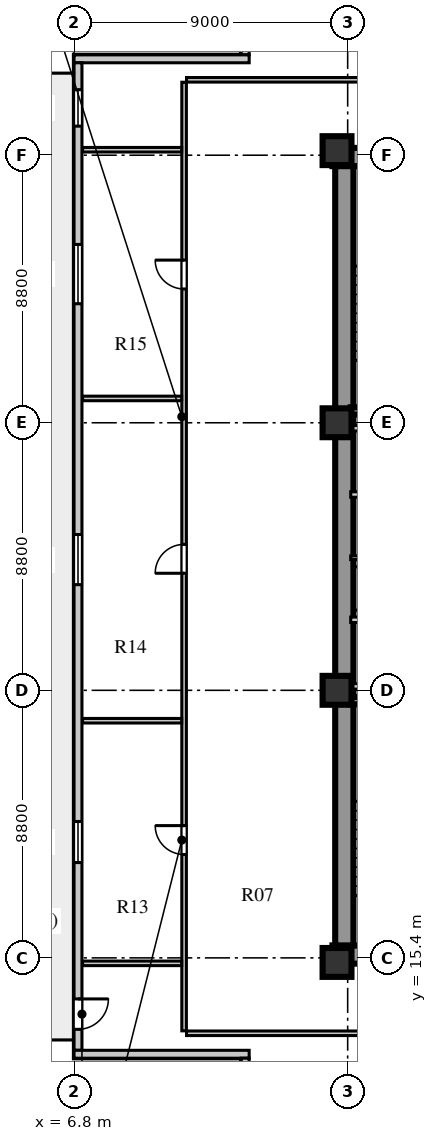
"""IFC4 building model, lengths in metres.
Left out: names, types, materials, properties, quantities, classifications, styles, units other than length and angle.
Written with IfcOpenShell. Run it as: python <this file> out.ifc"""

import sys

from ifc_helpers import new_model, si_unit, direction, frame, frame_2d, origin, origin_2d, place, context, subcontext, project, spatial, rectangle, extrude, element, fill, save


model = new_model("IFC4")
c1 = context("Model", 3, precision=1e-05, world=origin(), true_north=direction((0.0, 1.0)))
c2 = subcontext(c1, "Body", "Model", "MODEL_VIEW")
j1 = project(units=[si_unit("LENGTHUNIT", "METRE"), si_unit("PLANEANGLEUNIT", "RADIAN")], contexts=[c1])
p1 = place(None, origin())
s1 = spatial("IfcSite", under=j1, at=p1, CompositionType="ELEMENT")
p2 = place(p1, origin())
s2 = spatial("IfcBuilding", under=s1, at=p2, CompositionType="ELEMENT")
p3 = place(p2, frame((0.0, 0.0, 50.0)))
s3 = spatial("IfcBuildingStorey", under=s2, at=p3, CompositionType="ELEMENT", Elevation=50.0)
for number, where, z_axis, x_axis in (
    (1, (15.3, 15.51, 0.0), (0.0, 0.0, 1.0), (1.0, 0.0, 0.0)),
    (2, (15.3, 41.74, 0.0), (0.0, 0.0, 1.0), (1.0, 0.0, 0.0)),
):
    element("IfcWall", number, at=place(p3, frame(where, z_axis=z_axis, x_axis=x_axis)), inside=s3, PredefinedType="SHEAR", context=c2, shape_type="SweptSolid", body=[
        extrude(rectangle(XDim=9.88, YDim=0.6, at=frame_2d((4.94, 0.0))), origin(), (0.0, 0.0, 1.0), 3.72),
    ])
p4 = place(p3, frame((15.69, 15.81, 0.0), z_axis=(0.0, 0.0, 1.0), x_axis=(0.0, 1.0, 0.0)))
e3 = element("IfcWall", 3, at=p4, inside=s3, PredefinedType="SHEAR", context=c2, shape_type="SweptSolid", body=[
    extrude(rectangle(XDim=25.63, YDim=0.6, at=frame_2d((12.815, 0.0))), origin(), (0.0, 0.0, 1.0), 3.72),
])
for number, where, z_axis, x_axis in (
    (4, (15.45, 15.25, 0.0), (0.0, 0.0, 1.0), (1.0, 0.0, 0.0)),
    (5, (15.45, 24.2, 0.0), (0.0, 0.0, 1.0), (1.0, 0.0, 0.0)),
    (6, (15.45, 33.0, 0.0), (0.0, 0.0, 1.0), (1.0, 0.0, 0.0)),
    (7, (15.45, 41.95, 0.0), (0.0, 0.0, 1.0), (1.0, 0.0, 0.0)),
):
    element("IfcColumn", number, at=place(p3, frame(where, z_axis=z_axis, x_axis=x_axis)), inside=s3, PredefinedType="COLUMN", context=c2, shape_type="SweptSolid", body=[
        extrude(rectangle(XDim=0.95, YDim=0.95, at=origin_2d()), origin(), (0.0, 0.0, 1.0), 3.72),
    ])
p5 = place(p3, frame((12.43, 50.34, 0.0), z_axis=(0.0, 0.0, 1.0), x_axis=(0.0, -1.0, 0.0)))
e8 = element("IfcWall", 8, at=p5, inside=s3, PredefinedType="SOLIDWALL", context=c2, shape_type="SweptSolid", body=[
    extrude(rectangle(XDim=5.24, YDim=0.26, at=frame_2d((2.62, 0.0))), origin(), (0.0, 0.0, 1.0), 3.72),
])
p6 = place(p3, frame((12.56, 44.97, 0.0), z_axis=(0.0, 0.0, 1.0), x_axis=(-1.0, 0.0, 0.0)))
e9 = element("IfcWall", 9, at=p6, inside=s3, PredefinedType="SOLIDWALL", context=c2, shape_type="SweptSolid", body=[
    extrude(rectangle(XDim=5.76, YDim=0.26, at=frame_2d((2.88, 0.0))), origin(), (0.0, 0.0, 1.0), 3.72),
])
p7 = place(p3, frame((6.93, 44.84, 0.0), z_axis=(0.0, 0.0, 1.0), x_axis=(0.0, -1.0, 0.0)))
e10 = element("IfcWall", 10, at=p7, inside=s3, PredefinedType="SOLIDWALL", context=c2, shape_type="SweptSolid", body=[
    extrude(rectangle(XDim=32.48, YDim=0.26, at=frame_2d((16.24, 0.0))), origin(), (0.0, 0.0, 1.0), 3.72),
])
p8 = place(p7, frame((30.79, 0.0, 0.0)))
e11 = element("IfcOpeningElement", 11, at=p8, cuts=e10, PredefinedType="OPENING", context=c2, shape_type="SweptSolid", body=[
    extrude(rectangle(XDim=1.0, YDim=2.05, at=frame_2d((0.5, 1.025))), frame((0.0, 0.14, 0.0), z_axis=(0.0, -1.0, 0.0), x_axis=(1.0, 0.0, 0.0)), (0.0, 0.0, 1.0), 0.28),
])
p9 = place(p7, frame((24.955, 0.0, 0.8)))
e12 = element("IfcOpeningElement", 12, at=p9, cuts=e10, PredefinedType="OPENING", context=c2, shape_type="SweptSolid", body=[
    extrude(rectangle(XDim=1.35, YDim=1.9, at=frame_2d((0.675, 0.95))), frame((0.0, 0.14, 0.0), z_axis=(0.0, -1.0, 0.0), x_axis=(1.0, 0.0, 0.0)), (0.0, 0.0, 1.0), 0.28),
])
p10 = place(p7, frame((15.515, 0.0, 0.8)))
e13 = element("IfcOpeningElement", 13, at=p10, cuts=e10, PredefinedType="OPENING", context=c2, shape_type="SweptSolid", body=[
    extrude(rectangle(XDim=1.65, YDim=1.95, at=frame_2d((0.825, 0.975))), frame((0.0, 0.14, 0.0), z_axis=(0.0, -1.0, 0.0), x_axis=(1.0, 0.0, 0.0)), (0.0, 0.0, 1.0), 0.28),
])
p11 = place(p7, frame((5.975, 0.0, 0.8)))
e14 = element("IfcOpeningElement", 14, at=p11, cuts=e10, PredefinedType="OPENING", context=c2, shape_type="SweptSolid", body=[
    extrude(rectangle(XDim=1.95, YDim=2.0, at=frame_2d((0.975, 1.0))), frame((0.0, 0.14, 0.0), z_axis=(0.0, -1.0, 0.0), x_axis=(1.0, 0.0, 0.0)), (0.0, 0.0, 1.0), 0.28),
])
p12 = place(p7, frame((0.885, 0.0, 0.8)))
e15 = element("IfcOpeningElement", 15, at=p12, cuts=e10, PredefinedType="OPENING", context=c2, shape_type="SweptSolid", body=[
    extrude(rectangle(XDim=1.2, YDim=1.75, at=frame_2d((0.6, 0.875))), frame((0.0, 0.14, 0.0), z_axis=(0.0, -1.0, 0.0), x_axis=(1.0, 0.0, 0.0)), (0.0, 0.0, 1.0), 0.28),
])
p13 = place(p3, frame((6.8, 12.23, 0.0), z_axis=(0.0, 0.0, 1.0), x_axis=(1.0, 0.0, 0.0)))
e16 = element("IfcWall", 16, at=p13, inside=s3, PredefinedType="SOLIDWALL", context=c2, shape_type="SweptSolid", body=[
    extrude(rectangle(XDim=5.76, YDim=0.26, at=frame_2d((2.88, 0.0))), origin(), (0.0, 0.0, 1.0), 3.72),
])
p14 = place(p3, frame((12.43, 12.1, 0.0), z_axis=(0.0, 0.0, 1.0), x_axis=(0.0, -1.0, 0.0)))
e17 = element("IfcWall", 17, at=p14, inside=s3, PredefinedType="SOLIDWALL", context=c2, shape_type="SweptSolid", body=[
    extrude(rectangle(XDim=5.24, YDim=0.26, at=frame_2d((2.62, 0.0))), origin(), (0.0, 0.0, 1.0), 3.72),
])
p15 = place(p3, frame((15.9, 23.86, 0.0), z_axis=(0.0, 0.0, 1.0), x_axis=(1.0, 0.0, 0.0)))
e18 = element("IfcWall", 18, at=p15, inside=s3, PredefinedType="SHEAR", context=c2, shape_type="SweptSolid", body=[
    extrude(rectangle(XDim=3.52, YDim=0.24, at=frame_2d((1.76, 0.0))), origin(), (0.0, 0.0, 1.0), 4.0),
])
p16 = place(p3, frame((15.9, 26.52, 0.0), z_axis=(0.0, 0.0, 1.0), x_axis=(1.0, 0.0, 0.0)))
e19 = element("IfcWall", 19, at=p16, inside=s3, PredefinedType="SOLIDWALL", context=c2, shape_type="SweptSolid", body=[
    extrude(rectangle(XDim=8.68, YDim=0.18, at=frame_2d((4.34, 0.0))), origin(), (0.0, 0.0, 1.0), 3.72),
])
p17 = place(p16, frame((1.76, 0.0, 0.0)))
e20 = element("IfcOpeningElement", 20, at=p17, cuts=e19, PredefinedType="OPENING", context=c2, shape_type="SweptSolid", body=[
    extrude(rectangle(XDim=1.0, YDim=2.1, at=frame_2d((0.5, 1.05))), frame((0.0, 0.1, 0.0), z_axis=(0.0, -1.0, 0.0), x_axis=(1.0, 0.0, 0.0)), (0.0, 0.0, 1.0), 0.2),
])
p18 = place(p16, frame((3.6, 0.0, 0.0)))
e21 = element("IfcOpeningElement", 21, at=p18, cuts=e19, PredefinedType="OPENING", context=c2, shape_type="SweptSolid", body=[
    extrude(rectangle(XDim=1.0, YDim=2.1, at=frame_2d((0.5, 1.05))), frame((0.0, 0.1, 0.0), z_axis=(0.0, -1.0, 0.0), x_axis=(1.0, 0.0, 0.0)), (0.0, 0.0, 1.0), 0.2),
])
p19 = place(p16, frame((5.44, 0.0, 0.0)))
e22 = element("IfcOpeningElement", 22, at=p19, cuts=e19, PredefinedType="OPENING", context=c2, shape_type="SweptSolid", body=[
    extrude(rectangle(XDim=1.0, YDim=2.1, at=frame_2d((0.5, 1.05))), frame((0.0, 0.1, 0.0), z_axis=(0.0, -1.0, 0.0), x_axis=(1.0, 0.0, 0.0)), (0.0, 0.0, 1.0), 0.2),
])
p20 = place(p16, frame((7.28, 0.0, 0.0)))
e23 = element("IfcOpeningElement", 23, at=p20, cuts=e19, PredefinedType="OPENING", context=c2, shape_type="SweptSolid", body=[
    extrude(rectangle(XDim=1.0, YDim=2.1, at=frame_2d((0.5, 1.05))), frame((0.0, 0.1, 0.0), z_axis=(0.0, -1.0, 0.0), x_axis=(1.0, 0.0, 0.0)), (0.0, 0.0, 1.0), 0.2),
])
p21 = place(p3, frame((15.9, 24.33, 0.0), z_axis=(0.0, 0.0, 1.0), x_axis=(1.0, 0.0, 0.0)))
e24 = element("IfcWall", 24, at=p21, inside=s3, PredefinedType="SOLIDWALL", context=c2, shape_type="SweptSolid", body=[
    extrude(rectangle(XDim=8.68, YDim=0.18, at=frame_2d((4.34, 0.0))), origin(), (0.0, 0.0, 1.0), 3.02),
])
p22 = place(p3, frame((15.9, 28.56, 0.0), z_axis=(0.0, 0.0, 1.0), x_axis=(1.0, 0.0, 0.0)))
e25 = element("IfcWall", 25, at=p22, inside=s3, PredefinedType="PARTITIONING", context=c2, shape_type="SweptSolid", body=[
    extrude(rectangle(XDim=1.2, YDim=0.12, at=frame_2d((0.6, 0.0))), origin(), (0.0, 0.0, 1.0), 3.72),
])
p23 = place(p3, frame((15.9, 30.64, 0.0), z_axis=(0.0, 0.0, 1.0), x_axis=(1.0, 0.0, 0.0)))
e26 = element("IfcWall", 26, at=p23, inside=s3, PredefinedType="SOLIDWALL", context=c2, shape_type="SweptSolid", body=[
    extrude(rectangle(XDim=8.68, YDim=0.18, at=frame_2d((4.34, 0.0))), origin(), (0.0, 0.0, 1.0), 3.72),
])
p24 = place(p23, frame((1.76, 0.0, 0.0)))
e27 = element("IfcOpeningElement", 27, at=p24, cuts=e26, PredefinedType="OPENING", context=c2, shape_type="SweptSolid", body=[
    extrude(rectangle(XDim=1.0, YDim=2.1, at=frame_2d((0.5, 1.05))), frame((0.0, 0.1, 0.0), z_axis=(0.0, -1.0, 0.0), x_axis=(1.0, 0.0, 0.0)), (0.0, 0.0, 1.0), 0.2),
])
p25 = place(p23, frame((3.6, 0.0, 0.0)))
e28 = element("IfcOpeningElement", 28, at=p25, cuts=e26, PredefinedType="OPENING", context=c2, shape_type="SweptSolid", body=[
    extrude(rectangle(XDim=1.0, YDim=2.1, at=frame_2d((0.5, 1.05))), frame((0.0, 0.1, 0.0), z_axis=(0.0, -1.0, 0.0), x_axis=(1.0, 0.0, 0.0)), (0.0, 0.0, 1.0), 0.2),
])
p26 = place(p23, frame((5.44, 0.0, 0.0)))
e29 = element("IfcOpeningElement", 29, at=p26, cuts=e26, PredefinedType="OPENING", context=c2, shape_type="SweptSolid", body=[
    extrude(rectangle(XDim=1.0, YDim=2.1, at=frame_2d((0.5, 1.05))), frame((0.0, 0.1, 0.0), z_axis=(0.0, -1.0, 0.0), x_axis=(1.0, 0.0, 0.0)), (0.0, 0.0, 1.0), 0.2),
])
p27 = place(p23, frame((7.28, 0.0, 0.0)))
e30 = element("IfcOpeningElement", 30, at=p27, cuts=e26, PredefinedType="OPENING", context=c2, shape_type="SweptSolid", body=[
    extrude(rectangle(XDim=1.0, YDim=2.1, at=frame_2d((0.5, 1.05))), frame((0.0, 0.1, 0.0), z_axis=(0.0, -1.0, 0.0), x_axis=(1.0, 0.0, 0.0)), (0.0, 0.0, 1.0), 0.2),
])
p28 = place(p3, frame((15.9, 32.82, 0.0), z_axis=(0.0, 0.0, 1.0), x_axis=(1.0, 0.0, 0.0)))
e31 = element("IfcWall", 31, at=p28, inside=s3, PredefinedType="SOLIDWALL", context=c2, shape_type="SweptSolid", body=[
    extrude(rectangle(XDim=8.68, YDim=0.18, at=frame_2d((4.34, 0.0))), origin(), (0.0, 0.0, 1.0), 3.02),
])
p29 = place(p3, frame((15.9, 33.39, 0.0), z_axis=(0.0, 0.0, 1.0), x_axis=(1.0, 0.0, 0.0)))
e32 = element("IfcWall", 32, at=p29, inside=s3, PredefinedType="SHEAR", context=c2, shape_type="SweptSolid", body=[
    extrude(rectangle(XDim=3.52, YDim=0.24, at=frame_2d((1.76, 0.0))), origin(), (0.0, 0.0, 1.0), 4.0),
])
p30 = place(p3, frame((10.42, 13.0, 0.0), z_axis=(0.0, 0.0, 1.0), x_axis=(0.0, 1.0, 0.0)))
e33 = element("IfcWall", 33, at=p30, inside=s3, PredefinedType="PARTITIONING", context=c2, shape_type="SweptSolid", body=[
    extrude(rectangle(XDim=31.2, YDim=0.15, at=frame_2d((15.6, 0.0))), origin(), (0.0, 0.0, 1.0), 3.72),
])
p31 = place(p30, frame((5.8, 0.0, 0.0)))
e34 = element("IfcOpeningElement", 34, at=p31, cuts=e33, PredefinedType="OPENING", context=c2, shape_type="SweptSolid", body=[
    extrude(rectangle(XDim=0.95, YDim=2.08, at=frame_2d((0.475, 1.04))), frame((0.0, 0.085, 0.0), z_axis=(0.0, -1.0, 0.0), x_axis=(1.0, 0.0, 0.0)), (0.0, 0.0, 1.0), 0.17),
])
p32 = place(p30, frame((15.05, 0.0, 0.0)))
e35 = element("IfcOpeningElement", 35, at=p32, cuts=e33, PredefinedType="OPENING", context=c2, shape_type="SweptSolid", body=[
    extrude(rectangle(XDim=0.95, YDim=2.08, at=frame_2d((0.475, 1.04))), frame((0.0, 0.085, 0.0), z_axis=(0.0, -1.0, 0.0), x_axis=(1.0, 0.0, 0.0)), (0.0, 0.0, 1.0), 0.17),
])
p33 = place(p30, frame((24.4, 0.0, 0.0)))
e36 = element("IfcOpeningElement", 36, at=p33, cuts=e33, PredefinedType="OPENING", context=c2, shape_type="SweptSolid", body=[
    extrude(rectangle(XDim=0.95, YDim=2.08, at=frame_2d((0.475, 1.04))), frame((0.0, 0.085, 0.0), z_axis=(0.0, -1.0, 0.0), x_axis=(1.0, 0.0, 0.0)), (0.0, 0.0, 1.0), 0.17),
])
for number, where, z_axis, x_axis in (
    (37, (7.08, 15.22, 0.0), (0.0, 0.0, 1.0), (1.0, 0.0, 0.0)),
    (38, (7.08, 41.98, 0.0), (0.0, 0.0, 1.0), (1.0, 0.0, 0.0)),
):
    element("IfcWall", number, at=place(p3, frame(where, z_axis=z_axis, x_axis=x_axis)), inside=s3, PredefinedType="PARTITIONING", context=c2, shape_type="SweptSolid", body=[
        extrude(rectangle(XDim=3.26, YDim=0.15, at=frame_2d((1.63, 0.0))), origin(), (0.0, 0.0, 1.0), 3.22),
    ])
p34 = place(p3, frame((10.5, 12.92, 0.0), z_axis=(0.0, 0.0, 1.0), x_axis=(1.0, 0.0, 0.0)))
e39 = element("IfcWall", 39, at=p34, inside=s3, PredefinedType="PARTITIONING", context=c2, shape_type="SweptSolid", body=[
    extrude(rectangle(XDim=14.7, YDim=0.15, at=frame_2d((7.35, 0.0))), origin(), (0.0, 0.0, 1.0), 3.72),
])
p35 = place(p34, frame((6.2, 0.0, 0.0)))
e40 = element("IfcOpeningElement", 40, at=p35, cuts=e39, PredefinedType="OPENING", context=c2, shape_type="SweptSolid", body=[
    extrude(rectangle(XDim=1.0, YDim=2.08, at=frame_2d((0.5, 1.04))), frame((0.0, 0.085, 0.0), z_axis=(0.0, -1.0, 0.0), x_axis=(1.0, 0.0, 0.0)), (0.0, 0.0, 1.0), 0.17),
])
p36 = place(p3, frame((10.5, 44.28, 0.0), z_axis=(0.0, 0.0, 1.0), x_axis=(1.0, 0.0, 0.0)))
e41 = element("IfcWall", 41, at=p36, inside=s3, PredefinedType="PARTITIONING", context=c2, shape_type="SweptSolid", body=[
    extrude(rectangle(XDim=14.7, YDim=0.15, at=frame_2d((7.35, 0.0))), origin(), (0.0, 0.0, 1.0), 3.72),
])
p37 = place(p36, frame((6.2, 0.0, 0.0)))
e42 = element("IfcOpeningElement", 42, at=p37, cuts=e41, PredefinedType="OPENING", context=c2, shape_type="SweptSolid", body=[
    extrude(rectangle(XDim=1.0, YDim=2.08, at=frame_2d((0.5, 1.04))), frame((0.0, 0.085, 0.0), z_axis=(0.0, -1.0, 0.0), x_axis=(1.0, 0.0, 0.0)), (0.0, 0.0, 1.0), 0.17),
])
for number, where, z_axis, x_axis in (
    (43, (7.08, 23.2, 0.0), (0.0, 0.0, 1.0), (1.0, 0.0, 0.0)),
    (44, (7.08, 33.8, 0.0), (0.0, 0.0, 1.0), (1.0, 0.0, 0.0)),
):
    element("IfcWall", number, at=place(p3, frame(where, z_axis=z_axis, x_axis=x_axis)), inside=s3, PredefinedType="PARTITIONING", context=c2, shape_type="SweptSolid", body=[
        extrude(rectangle(XDim=3.26, YDim=0.15, at=frame_2d((1.63, 0.0))), origin(), (0.0, 0.0, 1.0), 3.72),
    ])
p38 = place(p8, frame((1.0, 0.0, 0.0), z_axis=(0.0, 0.0, 1.0), x_axis=(-1.0, 0.0, 0.0)))
e45 = element("IfcDoor", 45, at=p38, inside=s3, OperationType="SINGLE_SWING_RIGHT", PredefinedType="DOOR", context=c2, shape_type="SweptSolid", body=[
    extrude(rectangle(XDim=1.0, YDim=2.05, at=frame_2d((0.5, 1.025))), frame((0.0, 0.025, 0.0), z_axis=(0.0, -1.0, 0.0), x_axis=(1.0, 0.0, 0.0)), (0.0, 0.0, 1.0), 0.05),
])
fill(e11, e45)
p39 = place(p9, origin())
e46 = element("IfcWindow", 46, at=p39, inside=s3, PartitioningType="SINGLE_PANEL", PredefinedType="WINDOW", context=c2, shape_type="SweptSolid", body=[
    extrude(rectangle(XDim=1.35, YDim=1.9, at=frame_2d((0.675, 0.95))), frame((0.0, 0.03, 0.0), z_axis=(0.0, -1.0, 0.0), x_axis=(1.0, 0.0, 0.0)), (0.0, 0.0, 1.0), 0.06),
])
fill(e12, e46)
p40 = place(p10, origin())
e47 = element("IfcWindow", 47, at=p40, inside=s3, PartitioningType="SINGLE_PANEL", PredefinedType="WINDOW", context=c2, shape_type="SweptSolid", body=[
    extrude(rectangle(XDim=1.65, YDim=1.95, at=frame_2d((0.825, 0.975))), frame((0.0, 0.03, 0.0), z_axis=(0.0, -1.0, 0.0), x_axis=(1.0, 0.0, 0.0)), (0.0, 0.0, 1.0), 0.06),
])
fill(e13, e47)
p41 = place(p11, origin())
e48 = element("IfcWindow", 48, at=p41, inside=s3, PartitioningType="SINGLE_PANEL", PredefinedType="WINDOW", context=c2, shape_type="SweptSolid", body=[
    extrude(rectangle(XDim=1.95, YDim=2.0, at=frame_2d((0.975, 1.0))), frame((0.0, 0.03, 0.0), z_axis=(0.0, -1.0, 0.0), x_axis=(1.0, 0.0, 0.0)), (0.0, 0.0, 1.0), 0.06),
])
fill(e14, e48)
p42 = place(p12, origin())
e49 = element("IfcWindow", 49, at=p42, inside=s3, PartitioningType="SINGLE_PANEL", PredefinedType="WINDOW", context=c2, shape_type="SweptSolid", body=[
    extrude(rectangle(XDim=1.2, YDim=1.75, at=frame_2d((0.6, 0.875))), frame((0.0, 0.03, 0.0), z_axis=(0.0, -1.0, 0.0), x_axis=(1.0, 0.0, 0.0)), (0.0, 0.0, 1.0), 0.06),
])
fill(e15, e49)
p43 = place(p31, frame((0.95, 0.0, 0.0), z_axis=(0.0, 0.0, 1.0), x_axis=(-1.0, 0.0, 0.0)))
e50 = element("IfcDoor", 50, at=p43, inside=s3, OperationType="SINGLE_SWING_LEFT", PredefinedType="DOOR", context=c2, shape_type="SweptSolid", body=[
    extrude(rectangle(XDim=0.95, YDim=2.08, at=frame_2d((0.475, 1.04))), frame((0.0, 0.025, 0.0), z_axis=(0.0, -1.0, 0.0), x_axis=(1.0, 0.0, 0.0)), (0.0, 0.0, 1.0), 0.05),
])
fill(e34, e50)
p44 = place(p32, frame((0.95, 0.0, 0.0), z_axis=(0.0, 0.0, 1.0), x_axis=(-1.0, 0.0, 0.0)))
e51 = element("IfcDoor", 51, at=p44, inside=s3, OperationType="SINGLE_SWING_RIGHT", PredefinedType="DOOR", context=c2, shape_type="SweptSolid", body=[
    extrude(rectangle(XDim=0.95, YDim=2.08, at=frame_2d((0.475, 1.04))), frame((0.0, 0.025, 0.0), z_axis=(0.0, -1.0, 0.0), x_axis=(1.0, 0.0, 0.0)), (0.0, 0.0, 1.0), 0.05),
])
fill(e35, e51)
p45 = place(p33, frame((0.95, 0.0, 0.0), z_axis=(0.0, 0.0, 1.0), x_axis=(-1.0, 0.0, 0.0)))
e52 = element("IfcDoor", 52, at=p45, inside=s3, OperationType="SINGLE_SWING_LEFT", PredefinedType="DOOR", context=c2, shape_type="SweptSolid", body=[
    extrude(rectangle(XDim=0.95, YDim=2.08, at=frame_2d((0.475, 1.04))), frame((0.0, 0.025, 0.0), z_axis=(0.0, -1.0, 0.0), x_axis=(1.0, 0.0, 0.0)), (0.0, 0.0, 1.0), 0.05),
])
fill(e36, e52)
save(model, sys.argv[1])
